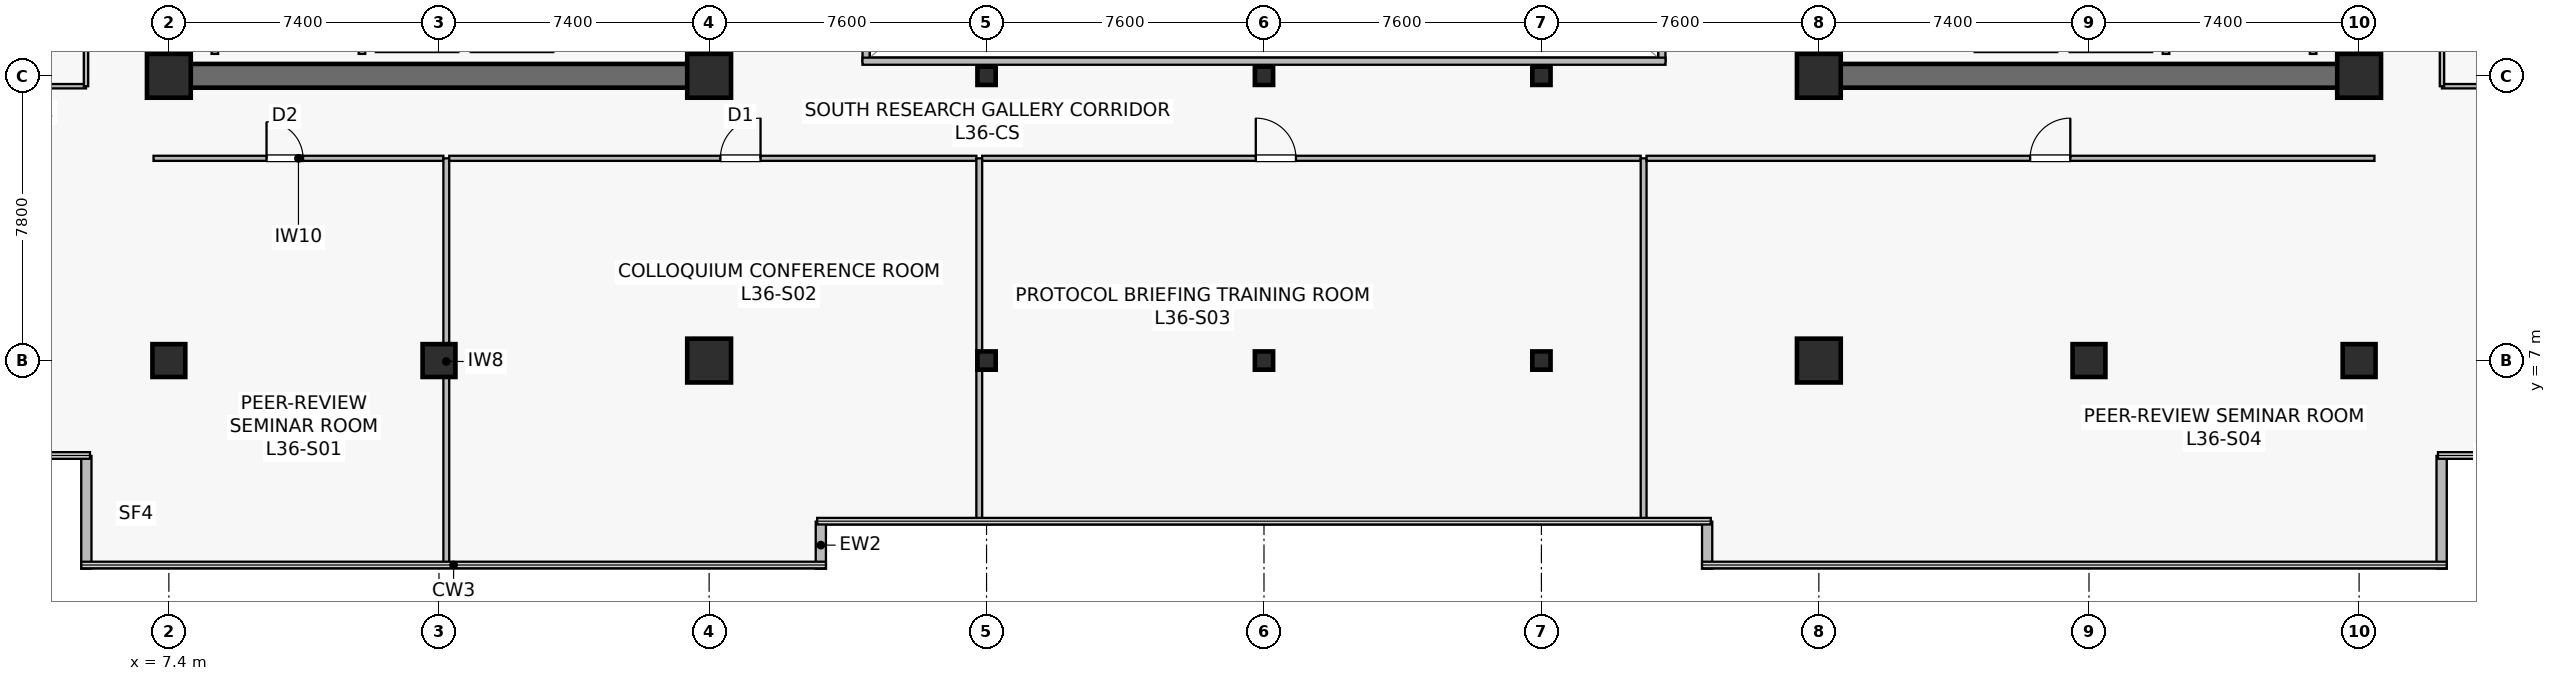
"""IFC4 building model, lengths in metres.
Left out: names, types, materials, properties, quantities, classifications, styles, units other than length and angle.
Written with IfcOpenShell. Run it as: python <this file> out.ifc"""

import sys

from ifc_helpers import new_model, si_unit, direction, frame, frame_2d, origin, origin_2d, place, context, subcontext, project, spatial, rectangle, hollow_rectangle, extrude, source, transform, mapped, element, fill, save


model = new_model("IFC4")
c1 = context("Model", 3, precision=1e-05, world=origin(), true_north=direction((0.0, 1.0)))
c2 = subcontext(c1, "Body", "Model", "MODEL_VIEW")
j1 = project(units=[si_unit("LENGTHUNIT", "METRE"), si_unit("PLANEANGLEUNIT", "RADIAN")], contexts=[c1])
p1 = place(None, origin())
s1 = spatial("IfcSite", under=j1, at=p1, CompositionType="ELEMENT")
p2 = place(p1, origin())
s2 = spatial("IfcBuilding", under=s1, at=p2, CompositionType="ELEMENT")
p3 = place(p2, frame((0.0, 0.0, 150.2)))
s3 = spatial("IfcBuildingStorey", under=s2, at=p3, CompositionType="ELEMENT", Elevation=150.2)
p4 = place(p3, frame((7.075, 14.8, 0.0), z_axis=(0.0, 0.0, 1.0), x_axis=(1.0, 0.0, 0.0)))
e1 = element("IfcWall", 1, at=p4, inside=s3, PredefinedType="SHEAR", context=c2, shape_type="SweptSolid", body=[
    extrude(rectangle(XDim=15.45, YDim=0.65, at=frame_2d((7.725, 0.0))), origin(), (0.0, 0.0, 1.0), 3.79),
])
p5 = place(p3, frame((7.4, 15.125, 0.0), z_axis=(0.0, 0.0, 1.0), x_axis=(0.0, 1.0, 0.0)))
e2 = element("IfcWall", 2, at=p5, inside=s3, PredefinedType="SHEAR", context=c2, shape_type="SweptSolid", body=[
    extrude(rectangle(XDim=18.35, YDim=0.65, at=frame_2d((9.175, 0.0))), origin(), (0.0, 0.0, 1.0), 3.79),
])
p6 = place(p3, frame((22.2, 15.125, 0.0), z_axis=(0.0, 0.0, 1.0), x_axis=(0.0, 1.0, 0.0)))
e3 = element("IfcWall", 3, at=p6, inside=s3, PredefinedType="SHEAR", context=c2, shape_type="SweptSolid", body=[
    extrude(rectangle(XDim=18.35, YDim=0.65, at=frame_2d((9.175, 0.0))), origin(), (0.0, 0.0, 1.0), 3.79),
])
p7 = place(p6, frame((3.425, 0.0, 0.0)))
e4 = element("IfcOpeningElement", 4, at=p7, cuts=e3, PredefinedType="OPENING", context=c2, shape_type="SweptSolid", body=[
    extrude(rectangle(XDim=1.42, YDim=2.2, at=frame_2d((0.71, 1.1))), frame((0.0, 0.335, 0.0), z_axis=(0.0, -1.0, 0.0), x_axis=(1.0, 0.0, 0.0)), (0.0, 0.0, 1.0), 0.67),
])
p8 = place(p3, frame((52.275, 14.8, 0.0), z_axis=(0.0, 0.0, 1.0), x_axis=(1.0, 0.0, 0.0)))
e5 = element("IfcWall", 5, at=p8, inside=s3, PredefinedType="SHEAR", context=c2, shape_type="SweptSolid", body=[
    extrude(rectangle(XDim=15.45, YDim=0.65, at=frame_2d((7.725, 0.0))), origin(), (0.0, 0.0, 1.0), 3.79),
])
p9 = place(p3, frame((52.6, 15.125, 0.0), z_axis=(0.0, 0.0, 1.0), x_axis=(0.0, 1.0, 0.0)))
e6 = element("IfcWall", 6, at=p9, inside=s3, PredefinedType="SHEAR", context=c2, shape_type="SweptSolid", body=[
    extrude(rectangle(XDim=18.35, YDim=0.65, at=frame_2d((9.175, 0.0))), origin(), (0.0, 0.0, 1.0), 3.79),
])
p10 = place(p9, frame((3.425, 0.0, 0.0)))
e7 = element("IfcOpeningElement", 7, at=p10, cuts=e6, PredefinedType="OPENING", context=c2, shape_type="SweptSolid", body=[
    extrude(rectangle(XDim=1.42, YDim=2.2, at=frame_2d((0.71, 1.1))), frame((0.0, 0.335, 0.0), z_axis=(0.0, -1.0, 0.0), x_axis=(1.0, 0.0, 0.0)), (0.0, 0.0, 1.0), 0.67),
])
p11 = place(p3, frame((67.4, 15.125, 0.0), z_axis=(0.0, 0.0, 1.0), x_axis=(0.0, 1.0, 0.0)))
e8 = element("IfcWall", 8, at=p11, inside=s3, PredefinedType="SHEAR", context=c2, shape_type="SweptSolid", body=[
    extrude(rectangle(XDim=18.35, YDim=0.65, at=frame_2d((9.175, 0.0))), origin(), (0.0, 0.0, 1.0), 3.79),
])
m1 = source(origin(), c2, "Body", "SweptSolid", [
    extrude(rectangle(XDim=0.9, YDim=0.9, at=origin_2d()), origin(), (0.0, 0.0, 1.0), 4.1),
])
p12 = place(p3, frame((14.8, 7.0, 0.0), z_axis=(0.0, 0.0, 1.0), x_axis=(1.0, 0.0, 0.0)))
e9 = element("IfcColumn", 9, at=p12, inside=s3, PredefinedType="COLUMN", context=c2, shape_type="MappedRepresentation", body=[
    mapped(m1, transform((0.0, 0.0, 0.0), scale=1.0)),
])
m2 = source(origin(), c2, "Body", "SweptSolid", [
    extrude(rectangle(XDim=1.2, YDim=1.2, at=origin_2d()), origin(), (0.0, 0.0, 1.0), 4.1),
])
for number, where, z_axis, x_axis in (
    (10, (22.2, 7.0, 0.0), (0.0, 0.0, 1.0), (1.0, 0.0, 0.0)),
    (11, (7.4, 14.8, 0.0), (0.0, 0.0, 1.0), (1.0, 0.0, 0.0)),
    (12, (22.2, 14.8, 0.0), (0.0, 0.0, 1.0), (1.0, 0.0, 0.0)),
    (13, (52.6, 7.0, 0.0), (0.0, 0.0, 1.0), (1.0, 0.0, 0.0)),
):
    element("IfcColumn", number, at=place(p3, frame(where, z_axis=z_axis, x_axis=x_axis)), inside=s3, PredefinedType="COLUMN", context=c2, shape_type="MappedRepresentation", body=[
        mapped(m2, transform((0.0, 0.0, 0.0), scale=1.0)),
    ])
p13 = place(p3, frame((60.0, 7.0, 0.0), z_axis=(0.0, 0.0, 1.0), x_axis=(1.0, 0.0, 0.0)))
e14 = element("IfcColumn", 14, at=p13, inside=s3, PredefinedType="COLUMN", context=c2, shape_type="MappedRepresentation", body=[
    mapped(m1, transform((0.0, 0.0, 0.0), scale=1.0)),
])
for number, where, z_axis, x_axis in (
    (15, (52.6, 14.8, 0.0), (0.0, 0.0, 1.0), (1.0, 0.0, 0.0)),
    (16, (67.4, 14.8, 0.0), (0.0, 0.0, 1.0), (1.0, 0.0, 0.0)),
):
    element("IfcColumn", number, at=place(p3, frame(where, z_axis=z_axis, x_axis=x_axis)), inside=s3, PredefinedType="COLUMN", context=c2, shape_type="MappedRepresentation", body=[
        mapped(m2, transform((0.0, 0.0, 0.0), scale=1.0)),
    ])
for number, where, z_axis, x_axis in (
    (17, (7.4, 7.0, 0.0), (0.0, 0.0, 1.0), (1.0, 0.0, 0.0)),
    (18, (67.4, 7.0, 0.0), (0.0, 0.0, 1.0), (1.0, 0.0, 0.0)),
):
    element("IfcColumn", number, at=place(p3, frame(where, z_axis=z_axis, x_axis=x_axis)), inside=s3, PredefinedType="COLUMN", context=c2, shape_type="MappedRepresentation", body=[
        mapped(m1, transform((0.0, 0.0, 0.0), scale=1.0)),
    ])
m3 = source(origin(), c2, "Body", "SweptSolid", [
    extrude(hollow_rectangle(XDim=0.5, YDim=0.5, WallThickness=0.022, at=origin_2d()), origin(), (0.0, 0.0, 1.0), 4.1),
])
for number, where, z_axis, x_axis in (
    (19, (29.8, 7.0, 0.0), (0.0, 0.0, 1.0), (1.0, 0.0, 0.0)),
    (20, (29.8, 14.8, 0.0), (0.0, 0.0, 1.0), (1.0, 0.0, 0.0)),
    (21, (37.4, 7.0, 0.0), (0.0, 0.0, 1.0), (1.0, 0.0, 0.0)),
    (22, (37.4, 14.8, 0.0), (0.0, 0.0, 1.0), (1.0, 0.0, 0.0)),
    (23, (45.0, 7.0, 0.0), (0.0, 0.0, 1.0), (1.0, 0.0, 0.0)),
    (24, (45.0, 14.8, 0.0), (0.0, 0.0, 1.0), (1.0, 0.0, 0.0)),
):
    element("IfcColumn", number, at=place(p3, frame(where, z_axis=z_axis, x_axis=x_axis)), inside=s3, PredefinedType="COLUMN", context=c2, shape_type="MappedRepresentation", body=[
        mapped(m3, transform((0.0, 0.0, 0.0), scale=1.0)),
    ])
for number, where, z_axis, x_axis in (
    (25, (25.26, 1.3, 0.0), (0.0, 0.0, 1.0), (0.0, 1.0, 0.0)),
    (26, (49.54, 2.588, 0.0), (0.0, 0.0, 1.0), (0.0, -1.0, 0.0)),
):
    element("IfcWall", number, at=place(p3, frame(where, z_axis=z_axis, x_axis=x_axis)), inside=s3, PredefinedType="STANDARD", context=c2, shape_type="SweptSolid", body=[
        extrude(rectangle(XDim=1.288, YDim=0.28, at=frame_2d((0.644, 0.0))), origin(), (0.0, 0.0, 1.0), 3.79),
    ])
for number, where, z_axis, x_axis in (
    (27, (69.66, 1.3, 0.0), (0.0, 0.0, 1.0), (0.0, 1.0, 0.0)),
    (28, (5.14, 4.388, 0.0), (0.0, 0.0, 1.0), (0.0, -1.0, 0.0)),
):
    element("IfcWall", number, at=place(p3, frame(where, z_axis=z_axis, x_axis=x_axis)), inside=s3, PredefinedType="STANDARD", context=c2, shape_type="SweptSolid", body=[
        extrude(rectangle(XDim=3.088, YDim=0.28, at=frame_2d((1.544, 0.0))), origin(), (0.0, 0.0, 1.0), 3.79),
    ])
p14 = place(p3, frame((13.07, 15.55, 0.0), z_axis=(0.0, 0.0, 1.0), x_axis=(1.0, 0.0, 0.0)))
e29 = element("IfcWall", 29, at=p14, inside=s3, PredefinedType="SOLIDWALL", context=c2, shape_type="SweptSolid", body=[
    extrude(rectangle(XDim=2.26, YDim=0.2, at=frame_2d((1.13, 0.0))), origin(), (0.0, 0.0, 1.0), 3.187),
])
p15 = place(p3, frame((15.67, 15.55, 0.0), z_axis=(0.0, 0.0, 1.0), x_axis=(1.0, 0.0, 0.0)))
e30 = element("IfcWall", 30, at=p15, inside=s3, PredefinedType="SOLIDWALL", context=c2, shape_type="SweptSolid", body=[
    extrude(rectangle(XDim=2.26, YDim=0.2, at=frame_2d((1.13, 0.0))), origin(), (0.0, 0.0, 1.0), 3.79),
])
for number, where, z_axis, x_axis in (
    (31, (12.69, 15.4, 0.0), (0.0, 0.0, 1.0), (0.0, 1.0, 0.0)),
    (32, (8.66, 15.4, 0.0), (0.0, 0.0, 1.0), (0.0, 1.0, 0.0)),
):
    element("IfcWall", number, at=place(p3, frame(where, z_axis=z_axis, x_axis=x_axis)), inside=s3, PredefinedType="SOLIDWALL", context=c2, shape_type="SweptSolid", body=[
        extrude(rectangle(XDim=2.4, YDim=0.18, at=frame_2d((1.2, 0.0))), origin(), (0.0, 0.0, 1.0), 3.79),
    ])
p16 = place(p3, frame((59.47, 15.55, 0.0), z_axis=(0.0, 0.0, 1.0), x_axis=(1.0, 0.0, 0.0)))
e33 = element("IfcWall", 33, at=p16, inside=s3, PredefinedType="SOLIDWALL", context=c2, shape_type="SweptSolid", body=[
    extrude(rectangle(XDim=2.26, YDim=0.2, at=frame_2d((1.13, 0.0))), origin(), (0.0, 0.0, 1.0), 3.187),
])
p17 = place(p3, frame((56.87, 15.55, 0.0), z_axis=(0.0, 0.0, 1.0), x_axis=(1.0, 0.0, 0.0)))
e34 = element("IfcWall", 34, at=p17, inside=s3, PredefinedType="SOLIDWALL", context=c2, shape_type="SweptSolid", body=[
    extrude(rectangle(XDim=2.26, YDim=0.2, at=frame_2d((1.13, 0.0))), origin(), (0.0, 0.0, 1.0), 3.79),
])
for number, where, z_axis, x_axis in (
    (35, (62.11, 15.4, 0.0), (0.0, 0.0, 1.0), (0.0, 1.0, 0.0)),
    (36, (66.14, 15.4, 0.0), (0.0, 0.0, 1.0), (0.0, 1.0, 0.0)),
):
    element("IfcWall", number, at=place(p3, frame(where, z_axis=z_axis, x_axis=x_axis)), inside=s3, PredefinedType="SOLIDWALL", context=c2, shape_type="SweptSolid", body=[
        extrude(rectangle(XDim=2.4, YDim=0.18, at=frame_2d((1.2, 0.0))), origin(), (0.0, 0.0, 1.0), 3.79),
    ])
p18 = place(p3, frame((26.5, 15.2, 0.0), z_axis=(0.0, 0.0, 1.0), x_axis=(0.0, 1.0, 0.0)))
e37 = element("IfcWall", 37, at=p18, inside=s3, PredefinedType="SOLIDWALL", context=c2, shape_type="SweptSolid", body=[
    extrude(rectangle(XDim=18.2, YDim=0.195, at=frame_2d((9.1, 0.0))), origin(), (0.0, 0.0, 1.0), 3.79),
])
p19 = place(p18, frame((1.8, 0.0, 0.9)))
e38 = element("IfcOpeningElement", 38, at=p19, cuts=e37, PredefinedType="OPENING", context=c2, shape_type="SweptSolid", body=[
    extrude(rectangle(XDim=1.5, YDim=1.4, at=frame_2d((0.75, 0.7))), frame((0.0, 0.107, 0.0), z_axis=(0.0, -1.0, 0.0), x_axis=(1.0, 0.0, 0.0)), (0.0, 0.0, 1.0), 0.215),
])
p20 = place(p18, frame((13.2, 0.0, 0.9)))
e39 = element("IfcOpeningElement", 39, at=p20, cuts=e37, PredefinedType="OPENING", context=c2, shape_type="SweptSolid", body=[
    extrude(rectangle(XDim=1.5, YDim=1.4, at=frame_2d((0.75, 0.7))), frame((0.0, 0.107, 0.0), z_axis=(0.0, -1.0, 0.0), x_axis=(1.0, 0.0, 0.0)), (0.0, 0.0, 1.0), 0.215),
])
p21 = place(p3, frame((48.3, 15.2, 0.0), z_axis=(0.0, 0.0, 1.0), x_axis=(0.0, 1.0, 0.0)))
e40 = element("IfcWall", 40, at=p21, inside=s3, PredefinedType="SOLIDWALL", context=c2, shape_type="SweptSolid", body=[
    extrude(rectangle(XDim=18.2, YDim=0.195, at=frame_2d((9.1, 0.0))), origin(), (0.0, 0.0, 1.0), 3.79),
])
p22 = place(p21, frame((1.8, 0.0, 0.9)))
e41 = element("IfcOpeningElement", 41, at=p22, cuts=e40, PredefinedType="OPENING", context=c2, shape_type="SweptSolid", body=[
    extrude(rectangle(XDim=1.5, YDim=1.4, at=frame_2d((0.75, 0.7))), frame((0.0, 0.107, 0.0), z_axis=(0.0, -1.0, 0.0), x_axis=(1.0, 0.0, 0.0)), (0.0, 0.0, 1.0), 0.215),
])
p23 = place(p21, frame((13.2, 0.0, 0.9)))
e42 = element("IfcOpeningElement", 42, at=p23, cuts=e40, PredefinedType="OPENING", context=c2, shape_type="SweptSolid", body=[
    extrude(rectangle(XDim=1.5, YDim=1.4, at=frame_2d((0.75, 0.7))), frame((0.0, 0.107, 0.0), z_axis=(0.0, -1.0, 0.0), x_axis=(1.0, 0.0, 0.0)), (0.0, 0.0, 1.0), 0.215),
])
p24 = place(p3, frame((26.4, 15.2, 0.0), z_axis=(0.0, 0.0, 1.0), x_axis=(1.0, 0.0, 0.0)))
e43 = element("IfcWall", 43, at=p24, inside=s3, PredefinedType="SOLIDWALL", context=c2, shape_type="SweptSolid", body=[
    extrude(rectangle(XDim=22.0, YDim=0.195, at=frame_2d((11.0, 0.0))), origin(), (0.0, 0.0, 1.0), 3.79),
])
p25 = place(p3, frame((6.98, 12.54, 0.0), z_axis=(0.0, 0.0, 1.0), x_axis=(1.0, 0.0, 0.0)))
e44 = element("IfcWall", 44, at=p25, inside=s3, PredefinedType="PARTITIONING", context=c2, shape_type="SweptSolid", body=[
    extrude(rectangle(XDim=7.94, YDim=0.14, at=frame_2d((3.97, 0.0))), origin(), (0.0, 0.0, 1.0), 3.187),
])
p26 = place(p25, frame((3.096, 0.0, 0.0)))
e45 = element("IfcOpeningElement", 45, at=p26, cuts=e44, PredefinedType="OPENING", context=c2, shape_type="SweptSolid", body=[
    extrude(rectangle(XDim=1.0, YDim=2.15, at=frame_2d((0.5, 1.075))), frame((0.0, 0.08, 0.0), z_axis=(0.0, -1.0, 0.0), x_axis=(1.0, 0.0, 0.0)), (0.0, 0.0, 1.0), 0.16),
])
p27 = place(p3, frame((15.0, 1.41, 0.0), z_axis=(0.0, 0.0, 1.0), x_axis=(0.0, 1.0, 0.0)))
e46 = element("IfcWall", 46, at=p27, inside=s3, PredefinedType="PARTITIONING", context=c2, shape_type="SweptSolid", body=[
    extrude(rectangle(XDim=11.13, YDim=0.16, at=frame_2d((5.565, 0.0))), origin(), (0.0, 0.0, 1.0), 3.075),
])
p28 = place(p3, frame((15.08, 12.54, 0.0), z_axis=(0.0, 0.0, 1.0), x_axis=(1.0, 0.0, 0.0)))
e47 = element("IfcWall", 47, at=p28, inside=s3, PredefinedType="PARTITIONING", context=c2, shape_type="SweptSolid", body=[
    extrude(rectangle(XDim=14.44, YDim=0.14, at=frame_2d((7.22, 0.0))), origin(), (0.0, 0.0, 1.0), 3.187),
])
p29 = place(p28, frame((7.428, 0.0, 0.0)))
e48 = element("IfcOpeningElement", 48, at=p29, cuts=e47, PredefinedType="OPENING", context=c2, shape_type="SweptSolid", body=[
    extrude(rectangle(XDim=1.1, YDim=2.18, at=frame_2d((0.55, 1.09))), frame((0.0, 0.08, 0.0), z_axis=(0.0, -1.0, 0.0), x_axis=(1.0, 0.0, 0.0)), (0.0, 0.0, 1.0), 0.16),
])
p30 = place(p3, frame((29.6, 2.61, 0.0), z_axis=(0.0, 0.0, 1.0), x_axis=(0.0, 1.0, 0.0)))
e49 = element("IfcWall", 49, at=p30, inside=s3, PredefinedType="PARTITIONING", context=c2, shape_type="SweptSolid", body=[
    extrude(rectangle(XDim=9.93, YDim=0.16, at=frame_2d((4.965, 0.0))), origin(), (0.0, 0.0, 1.0), 3.075),
])
p31 = place(p3, frame((29.68, 12.54, 0.0), z_axis=(0.0, 0.0, 1.0), x_axis=(1.0, 0.0, 0.0)))
e50 = element("IfcWall", 50, at=p31, inside=s3, PredefinedType="PARTITIONING", context=c2, shape_type="SweptSolid", body=[
    extrude(rectangle(XDim=18.04, YDim=0.14, at=frame_2d((9.02, 0.0))), origin(), (0.0, 0.0, 1.0), 3.187),
])
p32 = place(p31, frame((7.496, 0.0, 0.0)))
e51 = element("IfcOpeningElement", 51, at=p32, cuts=e50, PredefinedType="OPENING", context=c2, shape_type="SweptSolid", body=[
    extrude(rectangle(XDim=1.1, YDim=2.18, at=frame_2d((0.55, 1.09))), frame((0.0, 0.08, 0.0), z_axis=(0.0, -1.0, 0.0), x_axis=(1.0, 0.0, 0.0)), (0.0, 0.0, 1.0), 0.16),
])
p33 = place(p3, frame((47.8, 2.61, 0.0), z_axis=(0.0, 0.0, 1.0), x_axis=(0.0, 1.0, 0.0)))
e52 = element("IfcWall", 52, at=p33, inside=s3, PredefinedType="PARTITIONING", context=c2, shape_type="SweptSolid", body=[
    extrude(rectangle(XDim=9.93, YDim=0.16, at=frame_2d((4.965, 0.0))), origin(), (0.0, 0.0, 1.0), 3.075),
])
p34 = place(p3, frame((47.88, 12.54, 0.0), z_axis=(0.0, 0.0, 1.0), x_axis=(1.0, 0.0, 0.0)))
e53 = element("IfcWall", 53, at=p34, inside=s3, PredefinedType="PARTITIONING", context=c2, shape_type="SweptSolid", body=[
    extrude(rectangle(XDim=19.94, YDim=0.14, at=frame_2d((9.97, 0.0))), origin(), (0.0, 0.0, 1.0), 3.187),
])
p35 = place(p34, frame((10.508, 0.0, 0.0)))
e54 = element("IfcOpeningElement", 54, at=p35, cuts=e53, PredefinedType="OPENING", context=c2, shape_type="SweptSolid", body=[
    extrude(rectangle(XDim=1.1, YDim=2.18, at=frame_2d((0.55, 1.09))), frame((0.0, 0.08, 0.0), z_axis=(0.0, -1.0, 0.0), x_axis=(1.0, 0.0, 0.0)), (0.0, 0.0, 1.0), 0.16),
])
p36 = place(p3, frame((2.11, 14.515, 0.0), z_axis=(0.0, 0.0, 1.0), x_axis=(1.0, 0.0, 0.0)))
e55 = element("IfcWall", 55, at=p36, inside=s3, PredefinedType="PARTITIONING", context=c2, shape_type="SweptSolid", body=[
    extrude(rectangle(XDim=3.02, YDim=0.12, at=frame_2d((1.51, 0.0))), origin(), (0.0, 0.0, 1.0), 3.79),
])
p37 = place(p3, frame((5.13, 14.515, 0.0), z_axis=(0.0, 0.0, 1.0), x_axis=(0.0, 1.0, 0.0)))
e56 = element("IfcWall", 56, at=p37, inside=s3, PredefinedType="PARTITIONING", context=c2, shape_type="SweptSolid", body=[
    extrude(rectangle(XDim=4.425, YDim=0.12, at=frame_2d((2.212, 0.0))), origin(), (0.0, 0.0, 1.0), 3.79),
])
p38 = place(p37, frame((1.762, 0.0, 0.0)))
e57 = element("IfcOpeningElement", 57, at=p38, cuts=e56, PredefinedType="OPENING", context=c2, shape_type="SweptSolid", body=[
    extrude(rectangle(XDim=0.9, YDim=2.1, at=frame_2d((0.45, 1.05))), frame((0.0, 0.07, 0.0), z_axis=(0.0, -1.0, 0.0), x_axis=(1.0, 0.0, 0.0)), (0.0, 0.0, 1.0), 0.14),
])
p39 = place(p3, frame((69.67, 14.515, 0.0), z_axis=(0.0, 0.0, 1.0), x_axis=(1.0, 0.0, 0.0)))
e58 = element("IfcWall", 58, at=p39, inside=s3, PredefinedType="PARTITIONING", context=c2, shape_type="SweptSolid", body=[
    extrude(rectangle(XDim=3.02, YDim=0.12, at=frame_2d((1.51, 0.0))), origin(), (0.0, 0.0, 1.0), 3.79),
])
p40 = place(p3, frame((69.67, 14.515, 0.0), z_axis=(0.0, 0.0, 1.0), x_axis=(0.0, 1.0, 0.0)))
e59 = element("IfcWall", 59, at=p40, inside=s3, PredefinedType="PARTITIONING", context=c2, shape_type="SweptSolid", body=[
    extrude(rectangle(XDim=6.825, YDim=0.12, at=frame_2d((3.413, 0.0))), origin(), (0.0, 0.0, 1.0), 3.79),
])
p41 = place(p40, frame((2.962, 0.0, 0.0)))
e60 = element("IfcOpeningElement", 60, at=p41, cuts=e59, PredefinedType="OPENING", context=c2, shape_type="SweptSolid", body=[
    extrude(rectangle(XDim=0.9, YDim=2.1, at=frame_2d((0.45, 1.05))), frame((0.0, 0.07, 0.0), z_axis=(0.0, -1.0, 0.0), x_axis=(1.0, 0.0, 0.0)), (0.0, 0.0, 1.0), 0.14),
])
m4 = source(origin(), c2, "Body", "SweptSolid", [
    extrude(rectangle(XDim=1.0, YDim=2.15, at=frame_2d((0.5, 1.075))), frame((0.0, 0.025, 0.0), z_axis=(0.0, -1.0, 0.0), x_axis=(1.0, 0.0, 0.0)), (0.0, 0.0, 1.0), 0.05),
])
p42 = place(p26, origin())
e61 = element("IfcDoor", 61, at=p42, inside=s3, OperationType="SINGLE_SWING_LEFT", PredefinedType="DOOR", context=c2, shape_type="MappedRepresentation", body=[
    mapped(m4, transform((0.0, 0.0, 0.0), scale=1.0)),
])
fill(e45, e61)
m5 = source(origin(), c2, "Body", "SweptSolid", [
    extrude(rectangle(XDim=1.1, YDim=2.18, at=frame_2d((0.55, 1.09))), frame((0.0, 0.025, 0.0), z_axis=(0.0, -1.0, 0.0), x_axis=(1.0, 0.0, 0.0)), (0.0, 0.0, 1.0), 0.05),
])
p43 = place(p29, origin())
e62 = element("IfcDoor", 62, at=p43, inside=s3, OperationType="SINGLE_SWING_RIGHT", PredefinedType="DOOR", context=c2, shape_type="MappedRepresentation", body=[
    mapped(m5, transform((0.0, 0.0, 0.0), scale=1.0)),
])
fill(e48, e62)
p44 = place(p32, origin())
e63 = element("IfcDoor", 63, at=p44, inside=s3, OperationType="SINGLE_SWING_LEFT", PredefinedType="DOOR", context=c2, shape_type="MappedRepresentation", body=[
    mapped(m5, transform((0.0, 0.0, 0.0), scale=1.0)),
])
fill(e51, e63)
p45 = place(p35, origin())
e64 = element("IfcDoor", 64, at=p45, inside=s3, OperationType="SINGLE_SWING_RIGHT", PredefinedType="DOOR", context=c2, shape_type="MappedRepresentation", body=[
    mapped(m5, transform((0.0, 0.0, 0.0), scale=1.0)),
])
fill(e54, e64)
save(model, sys.argv[1])
